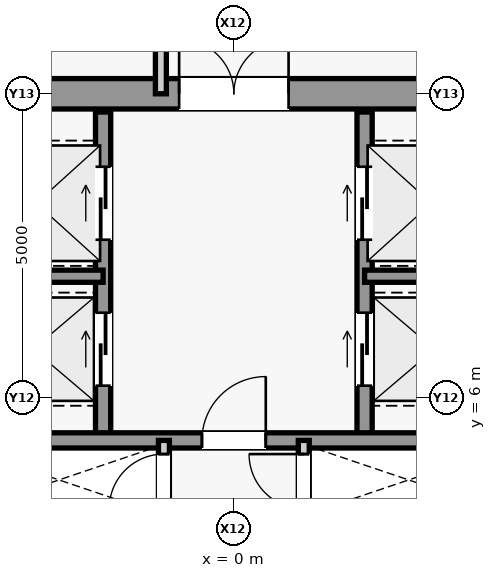
"""IFC4 building model, lengths in metres.
Left out: names, types, materials, properties, quantities, classifications, styles, units other than length and angle.
Written with IfcOpenShell. Run it as: python <this file> out.ifc"""

import sys

from ifc_helpers import new_model, si_unit, direction, frame, frame_2d, origin, place, context, subcontext, project, spatial, rectangle, extrude, source, transform, mapped, element, fill, save


model = new_model("IFC4")
c1 = context("Model", 3, precision=1e-05, world=origin(), true_north=direction((0.0, 1.0)))
c2 = subcontext(c1, "Body", "Model", "MODEL_VIEW")
j1 = project(units=[si_unit("LENGTHUNIT", "METRE"), si_unit("PLANEANGLEUNIT", "RADIAN")], contexts=[c1])
p1 = place(None, origin())
s1 = spatial("IfcSite", under=j1, at=p1, CompositionType="ELEMENT")
p2 = place(p1, origin())
s2 = spatial("IfcBuilding", under=s1, at=p2, CompositionType="ELEMENT")
p3 = place(p2, frame((0.0, 0.0, 159.1)))
s3 = spatial("IfcBuildingStorey", under=s2, at=p3, CompositionType="ELEMENT", Elevation=159.1)
m1 = source(origin(), c2, "Body", "SweptSolid", [
    extrude(rectangle(XDim=9.2, YDim=0.5, at=frame_2d((4.6, 0.0))), origin(), (0.0, 0.0, 1.0), 3.78),
])
p4 = place(p3, frame((-4.6, 11.0, 0.0), z_axis=(0.0, 0.0, 1.0), x_axis=(1.0, 0.0, 0.0)))
e1 = element("IfcWall", 1, at=p4, inside=s3, PredefinedType="SHEAR", context=c2, shape_type="MappedRepresentation", body=[
    mapped(m1, transform((0.0, 0.0, 0.0), scale=1.0)),
])
m2 = source(origin(), c2, "Body", "SweptSolid", [
    extrude(rectangle(XDim=1.8, YDim=2.25, at=frame_2d((0.9, 1.125))), frame((0.0, 0.26, 0.0), z_axis=(0.0, -1.0, 0.0), x_axis=(1.0, 0.0, 0.0)), (0.0, 0.0, 1.0), 0.52),
])
p5 = place(p4, frame((3.7, 0.0, 0.0)))
e2 = element("IfcOpeningElement", 2, at=p5, cuts=e1, PredefinedType="OPENING", context=c2, shape_type="MappedRepresentation", body=[
    mapped(m2, transform((0.0, 0.0, 0.0), scale=1.0)),
])
m3 = source(origin(), c2, "Body", "SweptSolid", [
    extrude(rectangle(XDim=5.4, YDim=0.25, at=frame_2d((2.7, 0.0))), origin(), (0.0, 0.0, 1.0), 3.78),
])
p6 = place(p3, frame((-2.15, 5.3, 0.0), z_axis=(0.0, 0.0, 1.0), x_axis=(0.0, 1.0, 0.0)))
e3 = element("IfcWall", 3, at=p6, inside=s3, PredefinedType="SHEAR", context=c2, shape_type="MappedRepresentation", body=[
    mapped(m3, transform((0.0, 0.0, 0.0), scale=1.0)),
])
m4 = source(origin(), c2, "Body", "SweptSolid", [
    extrude(rectangle(XDim=1.2, YDim=2.3, at=frame_2d((0.6, 1.15))), frame((0.0, 0.135, 0.0), z_axis=(0.0, -1.0, 0.0), x_axis=(1.0, 0.0, 0.0)), (0.0, 0.0, 1.0), 0.27),
])
p7 = place(p6, frame((3.3, 0.0, 0.0)))
e4 = element("IfcOpeningElement", 4, at=p7, cuts=e3, PredefinedType="OPENING", context=c2, shape_type="MappedRepresentation", body=[
    mapped(m4, transform((0.0, 0.0, 0.0), scale=1.0)),
])
p8 = place(p6, frame((0.9, 0.0, 0.0)))
e5 = element("IfcOpeningElement", 5, at=p8, cuts=e3, PredefinedType="OPENING", context=c2, shape_type="MappedRepresentation", body=[
    mapped(m4, transform((0.0, 0.0, 0.0), scale=1.0)),
])
p9 = place(p3, frame((2.15, 5.3, 0.0), z_axis=(0.0, 0.0, 1.0), x_axis=(0.0, 1.0, 0.0)))
e6 = element("IfcWall", 6, at=p9, inside=s3, PredefinedType="SHEAR", context=c2, shape_type="MappedRepresentation", body=[
    mapped(m3, transform((0.0, 0.0, 0.0), scale=1.0)),
])
p10 = place(p9, frame((3.3, 0.0, 0.0)))
e7 = element("IfcOpeningElement", 7, at=p10, cuts=e6, PredefinedType="OPENING", context=c2, shape_type="MappedRepresentation", body=[
    mapped(m4, transform((0.0, 0.0, 0.0), scale=1.0)),
])
p11 = place(p9, frame((0.9, 0.0, 0.0)))
e8 = element("IfcOpeningElement", 8, at=p11, cuts=e6, PredefinedType="OPENING", context=c2, shape_type="MappedRepresentation", body=[
    mapped(m4, transform((0.0, 0.0, 0.0), scale=1.0)),
])
m5 = source(origin(), c2, "Body", "SweptSolid", [
    extrude(rectangle(XDim=2.45, YDim=0.2, at=frame_2d((1.225, 0.0))), origin(), (0.0, 0.0, 1.0), 3.78),
])
for number, where, z_axis, x_axis in (
    (9, (-4.6, 8.0, 0.0), (0.0, 0.0, 1.0), (1.0, 0.0, 0.0)),
    (10, (2.15, 8.0, 0.0), (0.0, 0.0, 1.0), (1.0, 0.0, 0.0)),
):
    element("IfcWall", number, at=place(p3, frame(where, z_axis=z_axis, x_axis=x_axis)), inside=s3, PredefinedType="SHEAR", context=c2, shape_type="MappedRepresentation", body=[
        mapped(m5, transform((0.0, 0.0, 0.0), scale=1.0)),
    ])
m6 = source(origin(), c2, "Body", "SweptSolid", [
    extrude(rectangle(XDim=9.2, YDim=0.25, at=frame_2d((4.6, 0.0))), origin(), (0.0, 0.0, 1.0), 3.78),
])
p12 = place(p3, frame((-4.6, 5.3, 0.0), z_axis=(0.0, 0.0, 1.0), x_axis=(1.0, 0.0, 0.0)))
e11 = element("IfcWall", 11, at=p12, inside=s3, PredefinedType="SHEAR", context=c2, shape_type="MappedRepresentation", body=[
    mapped(m6, transform((0.0, 0.0, 0.0), scale=1.0)),
])
m7 = source(origin(), c2, "Body", "SweptSolid", [
    extrude(rectangle(XDim=1.05, YDim=2.2, at=frame_2d((0.525, 1.1))), frame((0.0, 0.135, 0.0), z_axis=(0.0, -1.0, 0.0), x_axis=(1.0, 0.0, 0.0)), (0.0, 0.0, 1.0), 0.27),
])
p13 = place(p12, frame((4.075, 0.0, 0.0)))
e12 = element("IfcOpeningElement", 12, at=p13, cuts=e11, PredefinedType="OPENING", context=c2, shape_type="MappedRepresentation", body=[
    mapped(m7, transform((0.0, 0.0, 0.0), scale=1.0)),
])
m8 = source(origin(), c2, "Body", "SweptSolid", [
    extrude(rectangle(XDim=10.6, YDim=0.18, at=frame_2d((5.3, 0.0))), origin(), (0.0, 0.0, 1.0), 3.78),
])
p14 = place(p3, frame((-1.15, -5.3, 0.0), z_axis=(0.0, 0.0, 1.0), x_axis=(0.0, 1.0, 0.0)))
e13 = element("IfcWall", 13, at=p14, inside=s3, PredefinedType="PARTITIONING", context=c2, shape_type="MappedRepresentation", body=[
    mapped(m8, transform((0.0, 0.0, 0.0), scale=1.0)),
])
m9 = source(origin(), c2, "Body", "SweptSolid", [
    extrude(rectangle(XDim=0.9, YDim=2.15, at=frame_2d((0.45, 1.075))), frame((0.0, 0.1, 0.0), z_axis=(0.0, -1.0, 0.0), x_axis=(1.0, 0.0, 0.0)), (0.0, 0.0, 1.0), 0.2),
])
p15 = place(p14, frame((1.9, 0.0, 0.0)))
e14 = element("IfcOpeningElement", 14, at=p15, cuts=e13, PredefinedType="OPENING", context=c2, shape_type="MappedRepresentation", body=[
    mapped(m9, transform((0.0, 0.0, 0.0), scale=1.0)),
])
p16 = place(p14, frame((6.55, 0.0, 0.0)))
e15 = element("IfcOpeningElement", 15, at=p16, cuts=e13, PredefinedType="OPENING", context=c2, shape_type="MappedRepresentation", body=[
    mapped(m9, transform((0.0, 0.0, 0.0), scale=1.0)),
])
p17 = place(p14, frame((9.475, 0.0, 0.0)))
e16 = element("IfcOpeningElement", 16, at=p17, cuts=e13, PredefinedType="OPENING", context=c2, shape_type="MappedRepresentation", body=[
    mapped(m9, transform((0.0, 0.0, 0.0), scale=1.0)),
])
p18 = place(p3, frame((1.15, -5.3, 0.0), z_axis=(0.0, 0.0, 1.0), x_axis=(0.0, 1.0, 0.0)))
e17 = element("IfcWall", 17, at=p18, inside=s3, PredefinedType="PARTITIONING", context=c2, shape_type="MappedRepresentation", body=[
    mapped(m8, transform((0.0, 0.0, 0.0), scale=1.0)),
])
p19 = place(p18, frame((0.85, 0.0, 0.0)))
e18 = element("IfcOpeningElement", 18, at=p19, cuts=e17, PredefinedType="OPENING", context=c2, shape_type="MappedRepresentation", body=[
    mapped(m9, transform((0.0, 0.0, 0.0), scale=1.0)),
])
p20 = place(p18, frame((3.55, 0.0, 0.0)))
e19 = element("IfcOpeningElement", 19, at=p20, cuts=e17, PredefinedType="OPENING", context=c2, shape_type="MappedRepresentation", body=[
    mapped(m9, transform((0.0, 0.0, 0.0), scale=1.0)),
])
p21 = place(p18, frame((6.3, 0.0, 0.0)))
e20 = element("IfcOpeningElement", 20, at=p21, cuts=e17, PredefinedType="OPENING", context=c2, shape_type="MappedRepresentation", body=[
    mapped(m9, transform((0.0, 0.0, 0.0), scale=1.0)),
])
p22 = place(p18, frame((8.25, 0.0, 0.0)))
e21 = element("IfcOpeningElement", 21, at=p22, cuts=e17, PredefinedType="OPENING", context=c2, shape_type="MappedRepresentation", body=[
    mapped(m9, transform((0.0, 0.0, 0.0), scale=1.0)),
])
p23 = place(p18, frame((9.475, 0.0, 0.0)))
e22 = element("IfcOpeningElement", 22, at=p23, cuts=e17, PredefinedType="OPENING", context=c2, shape_type="MappedRepresentation", body=[
    mapped(m9, transform((0.0, 0.0, 0.0), scale=1.0)),
])
m10 = source(origin(), c2, "Body", "SweptSolid", [
    extrude(rectangle(XDim=3.1, YDim=0.18, at=frame_2d((1.55, 0.0))), origin(), (0.0, 0.0, 1.0), 3.78),
])
p24 = place(p3, frame((-1.2, 11.0, 0.0), z_axis=(0.0, 0.0, 1.0), x_axis=(0.0, 1.0, 0.0)))
e23 = element("IfcWall", 23, at=p24, inside=s3, PredefinedType="PARTITIONING", context=c2, shape_type="MappedRepresentation", body=[
    mapped(m10, transform((0.0, 0.0, 0.0), scale=1.0)),
])
m11 = source(origin(), c2, "Body", "SweptSolid", [
    extrude(rectangle(XDim=1.05, YDim=2.2, at=frame_2d((0.525, 1.1))), frame((0.0, 0.025, 0.0), z_axis=(0.0, -1.0, 0.0), x_axis=(1.0, 0.0, 0.0)), (0.0, 0.0, 1.0), 0.05),
])
p25 = place(p13, origin())
e24 = element("IfcDoor", 24, at=p25, inside=s3, OperationType="SINGLE_SWING_RIGHT", PredefinedType="DOOR", context=c2, shape_type="MappedRepresentation", body=[
    mapped(m11, transform((0.0, 0.0, 0.0), scale=1.0)),
])
fill(e12, e24)
m12 = source(origin(), c2, "Body", "SweptSolid", [
    extrude(rectangle(XDim=1.8, YDim=2.25, at=frame_2d((0.9, 1.125))), frame((0.0, 0.025, 0.0), z_axis=(0.0, -1.0, 0.0), x_axis=(1.0, 0.0, 0.0)), (0.0, 0.0, 1.0), 0.05),
])
p26 = place(p5, origin())
e25 = element("IfcDoor", 25, at=p26, inside=s3, OperationType="SINGLE_SWING_RIGHT", PredefinedType="DOOR", context=c2, shape_type="MappedRepresentation", body=[
    mapped(m12, transform((0.0, 0.0, 0.0), scale=1.0)),
])
fill(e2, e25)
m13 = source(origin(), c2, "Body", "SweptSolid", [
    extrude(rectangle(XDim=0.9, YDim=2.15, at=frame_2d((0.45, 1.075))), frame((0.0, 0.025, 0.0), z_axis=(0.0, -1.0, 0.0), x_axis=(1.0, 0.0, 0.0)), (0.0, 0.0, 1.0), 0.05),
])
p27 = place(p17, origin())
e26 = element("IfcDoor", 26, at=p27, inside=s3, OperationType="SINGLE_SWING_LEFT", PredefinedType="DOOR", context=c2, shape_type="MappedRepresentation", body=[
    mapped(m13, transform((0.0, 0.0, 0.0), scale=1.0)),
])
fill(e16, e26)
p28 = place(p23, origin())
e27 = element("IfcDoor", 27, at=p28, inside=s3, OperationType="SINGLE_SWING_RIGHT", PredefinedType="DOOR", context=c2, shape_type="MappedRepresentation", body=[
    mapped(m13, transform((0.0, 0.0, 0.0), scale=1.0)),
])
fill(e22, e27)
m14 = source(origin(), c2, "Body", "SweptSolid", [
    extrude(rectangle(XDim=1.2, YDim=2.3, at=frame_2d((0.6, 1.15))), frame((0.0, 0.025, 0.0), z_axis=(0.0, -1.0, 0.0), x_axis=(1.0, 0.0, 0.0)), (0.0, 0.0, 1.0), 0.05),
])
p29 = place(p7, origin())
e28 = element("IfcDoor", 28, at=p29, inside=s3, OperationType="SLIDING_TO_LEFT", PredefinedType="DOOR", context=c2, shape_type="MappedRepresentation", body=[
    mapped(m14, transform((0.0, 0.0, 0.0), scale=1.0)),
])
fill(e4, e28)
p30 = place(p10, origin())
e29 = element("IfcDoor", 29, at=p30, inside=s3, OperationType="SLIDING_TO_LEFT", PredefinedType="DOOR", context=c2, shape_type="MappedRepresentation", body=[
    mapped(m14, transform((0.0, 0.0, 0.0), scale=1.0)),
])
fill(e7, e29)
p31 = place(p8, origin())
e30 = element("IfcDoor", 30, at=p31, inside=s3, OperationType="SLIDING_TO_LEFT", PredefinedType="DOOR", context=c2, shape_type="MappedRepresentation", body=[
    mapped(m14, transform((0.0, 0.0, 0.0), scale=1.0)),
])
fill(e5, e30)
p32 = place(p11, origin())
e31 = element("IfcDoor", 31, at=p32, inside=s3, OperationType="SLIDING_TO_LEFT", PredefinedType="DOOR", context=c2, shape_type="MappedRepresentation", body=[
    mapped(m14, transform((0.0, 0.0, 0.0), scale=1.0)),
])
fill(e8, e31)
save(model, sys.argv[1])
